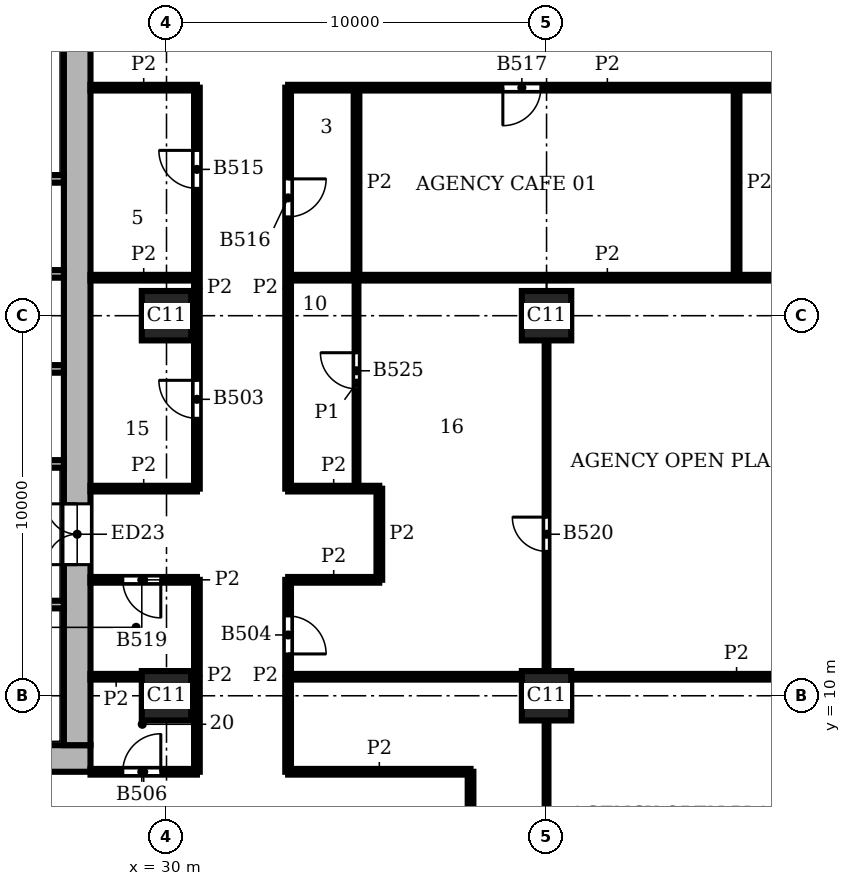
"""IFC4 building model, lengths in metres.
Left out: names, types, materials, properties, quantities, classifications, styles, units other than length and angle.
Written with IfcOpenShell. Run it as: python <this file> out.ifc"""

import sys

from ifc_helpers import new_model, si_unit, direction, frame, frame_2d, origin, origin_2d, place, context, subcontext, project, spatial, rectangle, extrude, element, fill, save


model = new_model("IFC4")
c1 = context("Model", 3, precision=1e-05, world=origin(), true_north=direction((0.0, 1.0)))
c2 = subcontext(c1, "Body", "Model", "MODEL_VIEW")
j1 = project(units=[si_unit("LENGTHUNIT", "METRE"), si_unit("PLANEANGLEUNIT", "RADIAN")], contexts=[c1])
p1 = place(None, origin())
s1 = spatial("IfcSite", under=j1, at=p1, CompositionType="ELEMENT")
p2 = place(p1, origin())
s2 = spatial("IfcBuilding", under=s1, at=p2, CompositionType="ELEMENT")
p3 = place(p2, frame((0.0, 0.0, 178.5)))
s3 = spatial("IfcBuildingStorey", under=s2, at=p3, CompositionType="ELEMENT", Elevation=178.5)
for number, where, z_axis, x_axis in (
    (1, (30.0, 10.0, 0.0), (0.0, 0.0, 1.0), (1.0, 0.0, 0.0)),
    (2, (30.0, 20.0, 0.0), (0.0, 0.0, 1.0), (1.0, 0.0, 0.0)),
    (3, (40.0, 10.0, 0.0), (0.0, 0.0, 1.0), (1.0, 0.0, 0.0)),
    (4, (40.0, 20.0, 0.0), (0.0, 0.0, 1.0), (1.0, 0.0, 0.0)),
):
    element("IfcColumn", number, at=place(p3, frame(where, z_axis=z_axis, x_axis=x_axis)), inside=s3, PredefinedType="COLUMN", context=c2, shape_type="SweptSolid", body=[
        extrude(rectangle(XDim=1.3, YDim=1.3, at=origin_2d()), origin(), (0.0, 0.0, 1.0), 3.9),
    ])
p4 = place(p3, frame((8.0, 8.35, 0.0), z_axis=(0.0, 0.0, 1.0), x_axis=(1.0, 0.0, 0.0)))
e5 = element("IfcWall", 5, at=p4, inside=s3, PredefinedType="SHEAR", context=c2, shape_type="SweptSolid", body=[
    extrude(rectangle(XDim=20.0, YDim=0.7, at=frame_2d((10.0, 0.0))), origin(), (0.0, 0.0, 1.0), 3.9),
])
p5 = place(p3, frame((27.65, 8.7, 0.0), z_axis=(0.0, 0.0, 1.0), x_axis=(0.0, 1.0, 0.0)))
e6 = element("IfcWall", 6, at=p5, inside=s3, PredefinedType="SHEAR", context=c2, shape_type="SweptSolid", body=[
    extrude(rectangle(XDim=18.6, YDim=0.7, at=frame_2d((9.3, 0.0))), origin(), (0.0, 0.0, 1.0), 3.9),
])
p6 = place(p5, frame((4.75, 0.0, 0.0)))
e7 = element("IfcOpeningElement", 7, at=p6, cuts=e6, PredefinedType="OPENING", context=c2, shape_type="SweptSolid", body=[
    extrude(rectangle(XDim=1.6, YDim=2.1, at=frame_2d((0.8, 1.05))), frame((0.0, 0.36, 0.0), z_axis=(0.0, -1.0, 0.0), x_axis=(1.0, 0.0, 0.0)), (0.0, 0.0, 1.0), 0.72),
])
p7 = place(p3, frame((13.8, 12.4, 0.0), z_axis=(0.0, 0.0, 1.0), x_axis=(1.0, 0.0, 0.0)))
e8 = element("IfcWall", 8, at=p7, inside=s3, PredefinedType="SHEAR", context=c2, shape_type="SweptSolid", body=[
    extrude(rectangle(XDim=13.5, YDim=0.2, at=frame_2d((6.75, 0.0))), origin(), (0.0, 0.0, 1.0), 3.58),
])
p8 = place(p7, frame((2.4, 0.0, 0.0)))
e9 = element("IfcOpeningElement", 9, at=p8, cuts=e8, PredefinedType="OPENING", context=c2, shape_type="SweptSolid", body=[
    extrude(rectangle(XDim=1.1, YDim=2.1, at=frame_2d((0.55, 1.05))), frame((0.0, 0.11, 0.0), z_axis=(0.0, -1.0, 0.0), x_axis=(1.0, 0.0, 0.0)), (0.0, 0.0, 1.0), 0.22),
])
p9 = place(p7, frame((4.9, 0.0, 0.0)))
e10 = element("IfcOpeningElement", 10, at=p9, cuts=e8, PredefinedType="OPENING", context=c2, shape_type="SweptSolid", body=[
    extrude(rectangle(XDim=1.1, YDim=2.1, at=frame_2d((0.55, 1.05))), frame((0.0, 0.11, 0.0), z_axis=(0.0, -1.0, 0.0), x_axis=(1.0, 0.0, 0.0)), (0.0, 0.0, 1.0), 0.22),
])
p10 = place(p7, frame((0.2, 0.0, 0.0)))
e11 = element("IfcOpeningElement", 11, at=p10, cuts=e8, PredefinedType="OPENING", context=c2, shape_type="SweptSolid", body=[
    extrude(rectangle(XDim=1.0, YDim=2.1, at=frame_2d((0.5, 1.05))), frame((0.0, 0.11, 0.0), z_axis=(0.0, -1.0, 0.0), x_axis=(1.0, 0.0, 0.0)), (0.0, 0.0, 1.0), 0.22),
])
for number, where, z_axis, x_axis in (
    (12, (24.3, 16.1, 0.0), (0.0, 0.0, 1.0), (1.0, 0.0, 0.0)),
    (13, (24.3, 18.6, 0.0), (0.0, 0.0, 1.0), (1.0, 0.0, 0.0)),
    (14, (24.3, 21.1, 0.0), (0.0, 0.0, 1.0), (1.0, 0.0, 0.0)),
):
    element("IfcWall", number, at=place(p3, frame(where, z_axis=z_axis, x_axis=x_axis)), inside=s3, PredefinedType="SHEAR", context=c2, shape_type="SweptSolid", body=[
        extrude(rectangle(XDim=3.0, YDim=0.2, at=frame_2d((1.5, 0.0))), origin(), (0.0, 0.0, 1.0), 3.58),
    ])
p11 = place(p3, frame((13.8, 23.6, 0.0), z_axis=(0.0, 0.0, 1.0), x_axis=(1.0, 0.0, 0.0)))
e15 = element("IfcWall", 15, at=p11, inside=s3, PredefinedType="SHEAR", context=c2, shape_type="SweptSolid", body=[
    extrude(rectangle(XDim=13.5, YDim=0.2, at=frame_2d((6.75, 0.0))), origin(), (0.0, 0.0, 1.0), 3.58),
])
p12 = place(p11, frame((2.4, 0.0, 0.0)))
e16 = element("IfcOpeningElement", 16, at=p12, cuts=e15, PredefinedType="OPENING", context=c2, shape_type="SweptSolid", body=[
    extrude(rectangle(XDim=1.1, YDim=2.1, at=frame_2d((0.55, 1.05))), frame((0.0, 0.11, 0.0), z_axis=(0.0, -1.0, 0.0), x_axis=(1.0, 0.0, 0.0)), (0.0, 0.0, 1.0), 0.22),
])
p13 = place(p11, frame((4.9, 0.0, 0.0)))
e17 = element("IfcOpeningElement", 17, at=p13, cuts=e15, PredefinedType="OPENING", context=c2, shape_type="SweptSolid", body=[
    extrude(rectangle(XDim=1.1, YDim=2.1, at=frame_2d((0.55, 1.05))), frame((0.0, 0.11, 0.0), z_axis=(0.0, -1.0, 0.0), x_axis=(1.0, 0.0, 0.0)), (0.0, 0.0, 1.0), 0.22),
])
p14 = place(p11, frame((0.2, 0.0, 0.0)))
e18 = element("IfcOpeningElement", 18, at=p14, cuts=e15, PredefinedType="OPENING", context=c2, shape_type="SweptSolid", body=[
    extrude(rectangle(XDim=1.0, YDim=2.1, at=frame_2d((0.5, 1.05))), frame((0.0, 0.11, 0.0), z_axis=(0.0, -1.0, 0.0), x_axis=(1.0, 0.0, 0.0)), (0.0, 0.0, 1.0), 0.22),
])
p15 = place(p3, frame((35.0, 15.451, 0.0), z_axis=(0.0, 0.0, 1.0), x_axis=(0.0, 1.0, 0.0)))
e19 = element("IfcWall", 19, at=p15, inside=s3, PredefinedType="PARTITIONING", context=c2, shape_type="SweptSolid", body=[
    extrude(rectangle(XDim=5.548, YDim=0.1, at=frame_2d((2.774, 0.0))), origin(), (0.0, 0.0, 1.0), 3.58),
])
p16 = place(p15, frame((2.625, 0.0, 0.0)))
e20 = element("IfcOpeningElement", 20, at=p16, cuts=e19, PredefinedType="OPENING", context=c2, shape_type="SweptSolid", body=[
    extrude(rectangle(XDim=0.95, YDim=2.1, at=frame_2d((0.475, 1.05))), frame((0.0, 0.06, 0.0), z_axis=(0.0, -1.0, 0.0), x_axis=(1.0, 0.0, 0.0)), (0.0, 0.0, 1.0), 0.12),
])
p17 = place(p3, frame((40.0, 0.45, 0.0), z_axis=(0.0, 0.0, 1.0), x_axis=(0.0, 1.0, 0.0)))
e21 = element("IfcWall", 21, at=p17, inside=s3, PredefinedType="PARTITIONING", context=c2, shape_type="SweptSolid", body=[
    extrude(rectangle(XDim=8.9, YDim=0.1, at=frame_2d((4.45, 0.0))), origin(), (0.0, 0.0, 1.0), 3.58),
])
p18 = place(p17, frame((4.0, 0.0, 0.0)))
e22 = element("IfcOpeningElement", 22, at=p18, cuts=e21, PredefinedType="OPENING", context=c2, shape_type="SweptSolid", body=[
    extrude(rectangle(XDim=0.9, YDim=2.1, at=frame_2d((0.45, 1.05))), frame((0.0, 0.06, 0.0), z_axis=(0.0, -1.0, 0.0), x_axis=(1.0, 0.0, 0.0)), (0.0, 0.0, 1.0), 0.12),
])
p19 = place(p3, frame((40.0, 10.65, 0.0), z_axis=(0.0, 0.0, 1.0), x_axis=(0.0, 1.0, 0.0)))
e23 = element("IfcWall", 23, at=p19, inside=s3, PredefinedType="PARTITIONING", context=c2, shape_type="SweptSolid", body=[
    extrude(rectangle(XDim=8.7, YDim=0.1, at=frame_2d((4.35, 0.0))), origin(), (0.0, 0.0, 1.0), 3.58),
])
p20 = place(p19, frame((3.15, 0.0, 0.0)))
e24 = element("IfcOpeningElement", 24, at=p20, cuts=e23, PredefinedType="OPENING", context=c2, shape_type="SweptSolid", body=[
    extrude(rectangle(XDim=0.9, YDim=2.1, at=frame_2d((0.45, 1.05))), frame((0.0, 0.06, 0.0), z_axis=(0.0, -1.0, 0.0), x_axis=(1.0, 0.0, 0.0)), (0.0, 0.0, 1.0), 0.12),
])
p21 = place(p3, frame((30.8, 8.0, 0.0), z_axis=(0.0, 0.0, 1.0), x_axis=(0.0, 1.0, 0.0)))
e25 = element("IfcWall", 25, at=p21, inside=s3, PredefinedType="PARTITIONING", context=c2, shape_type="SweptSolid", body=[
    extrude(rectangle(XDim=5.05, YDim=0.15, at=frame_2d((2.525, 0.0))), origin(), (0.0, 0.0, 1.0), 3.58),
])
p22 = place(p3, frame((30.8, 15.45, 0.0), z_axis=(0.0, 0.0, 1.0), x_axis=(0.0, 1.0, 0.0)))
e26 = element("IfcWall", 26, at=p22, inside=s3, PredefinedType="PARTITIONING", context=c2, shape_type="SweptSolid", body=[
    extrude(rectangle(XDim=10.55, YDim=0.15, at=frame_2d((5.275, 0.0))), origin(), (0.0, 0.0, 1.0), 3.58),
])
p23 = place(p22, frame((1.85, 0.0, 0.0)))
e27 = element("IfcOpeningElement", 27, at=p23, cuts=e26, PredefinedType="OPENING", context=c2, shape_type="SweptSolid", body=[
    extrude(rectangle(XDim=1.0, YDim=2.1, at=frame_2d((0.5, 1.05))), frame((0.0, 0.085, 0.0), z_axis=(0.0, -1.0, 0.0), x_axis=(1.0, 0.0, 0.0)), (0.0, 0.0, 1.0), 0.17),
])
p24 = place(p22, frame((7.9, 0.0, 0.0)))
e28 = element("IfcOpeningElement", 28, at=p24, cuts=e26, PredefinedType="OPENING", context=c2, shape_type="SweptSolid", body=[
    extrude(rectangle(XDim=1.0, YDim=2.1, at=frame_2d((0.5, 1.05))), frame((0.0, 0.085, 0.0), z_axis=(0.0, -1.0, 0.0), x_axis=(1.0, 0.0, 0.0)), (0.0, 0.0, 1.0), 0.17),
])
p25 = place(p3, frame((33.2, 8.0, 0.0), z_axis=(0.0, 0.0, 1.0), x_axis=(0.0, 1.0, 0.0)))
e29 = element("IfcWall", 29, at=p25, inside=s3, PredefinedType="PARTITIONING", context=c2, shape_type="SweptSolid", body=[
    extrude(rectangle(XDim=5.049, YDim=0.15, at=frame_2d((2.524, 0.0))), origin(), (0.0, 0.0, 1.0), 3.58),
])
p26 = place(p25, frame((3.1, 0.0, 0.0)))
e30 = element("IfcOpeningElement", 30, at=p26, cuts=e29, PredefinedType="OPENING", context=c2, shape_type="SweptSolid", body=[
    extrude(rectangle(XDim=1.0, YDim=2.1, at=frame_2d((0.5, 1.05))), frame((0.0, 0.085, 0.0), z_axis=(0.0, -1.0, 0.0), x_axis=(1.0, 0.0, 0.0)), (0.0, 0.0, 1.0), 0.17),
])
p27 = place(p3, frame((33.2, 15.45, 0.0), z_axis=(0.0, 0.0, 1.0), x_axis=(0.0, 1.0, 0.0)))
e31 = element("IfcWall", 31, at=p27, inside=s3, PredefinedType="PARTITIONING", context=c2, shape_type="SweptSolid", body=[
    extrude(rectangle(XDim=10.55, YDim=0.15, at=frame_2d((5.275, 0.0))), origin(), (0.0, 0.0, 1.0), 3.58),
])
p28 = place(p27, frame((7.15, 0.0, 0.0)))
e32 = element("IfcOpeningElement", 32, at=p28, cuts=e31, PredefinedType="OPENING", context=c2, shape_type="SweptSolid", body=[
    extrude(rectangle(XDim=1.0, YDim=2.1, at=frame_2d((0.5, 1.05))), frame((0.0, 0.085, 0.0), z_axis=(0.0, -1.0, 0.0), x_axis=(1.0, 0.0, 0.0)), (0.0, 0.0, 1.0), 0.17),
])
p29 = place(p3, frame((35.0, 21.0, 0.0), z_axis=(0.0, 0.0, 1.0), x_axis=(0.0, 1.0, 0.0)))
e33 = element("IfcWall", 33, at=p29, inside=s3, PredefinedType="PARTITIONING", context=c2, shape_type="SweptSolid", body=[
    extrude(rectangle(XDim=5.0, YDim=0.15, at=frame_2d((2.5, 0.0))), origin(), (0.0, 0.0, 1.0), 3.58),
])
p30 = place(p3, frame((35.6, 13.052, 0.0), z_axis=(0.0, 0.0, 1.0), x_axis=(0.0, 1.0, 0.0)))
e34 = element("IfcWall", 34, at=p30, inside=s3, PredefinedType="PARTITIONING", context=c2, shape_type="SweptSolid", body=[
    extrude(rectangle(XDim=2.396, YDim=0.15, at=frame_2d((1.198, 0.0))), origin(), (0.0, 0.0, 1.0), 3.58),
])
p31 = place(p3, frame((38.0, 4.5, 0.0), z_axis=(0.0, 0.0, 1.0), x_axis=(0.0, 1.0, 0.0)))
e35 = element("IfcWall", 35, at=p31, inside=s3, PredefinedType="PARTITIONING", context=c2, shape_type="SweptSolid", body=[
    extrude(rectangle(XDim=3.5, YDim=0.15, at=frame_2d((1.75, 0.0))), origin(), (0.0, 0.0, 1.0), 3.58),
])
p32 = place(p3, frame((45.0, 21.0, 0.0), z_axis=(0.0, 0.0, 1.0), x_axis=(0.0, 1.0, 0.0)))
e36 = element("IfcWall", 36, at=p32, inside=s3, PredefinedType="PARTITIONING", context=c2, shape_type="SweptSolid", body=[
    extrude(rectangle(XDim=5.0, YDim=0.15, at=frame_2d((2.5, 0.0))), origin(), (0.0, 0.0, 1.0), 3.58),
])
p33 = place(p3, frame((28.0, 8.0, 0.0), z_axis=(0.0, 0.0, 1.0), x_axis=(1.0, 0.0, 0.0)))
e37 = element("IfcWall", 37, at=p33, inside=s3, PredefinedType="PARTITIONING", context=c2, shape_type="SweptSolid", body=[
    extrude(rectangle(XDim=2.8, YDim=0.15, at=frame_2d((1.4, 0.0))), origin(), (0.0, 0.0, 1.0), 3.58),
])
p34 = place(p33, frame((0.85, 0.0, 0.0)))
e38 = element("IfcOpeningElement", 38, at=p34, cuts=e37, PredefinedType="OPENING", context=c2, shape_type="SweptSolid", body=[
    extrude(rectangle(XDim=1.0, YDim=2.1, at=frame_2d((0.5, 1.05))), frame((0.0, 0.085, 0.0), z_axis=(0.0, -1.0, 0.0), x_axis=(1.0, 0.0, 0.0)), (0.0, 0.0, 1.0), 0.17),
])
p35 = place(p3, frame((33.2, 8.0, 0.0), z_axis=(0.0, 0.0, 1.0), x_axis=(1.0, 0.0, 0.0)))
e39 = element("IfcWall", 39, at=p35, inside=s3, PredefinedType="PARTITIONING", context=c2, shape_type="SweptSolid", body=[
    extrude(rectangle(XDim=4.8, YDim=0.15, at=frame_2d((2.4, 0.0))), origin(), (0.0, 0.0, 1.0), 3.58),
])
p36 = place(p3, frame((28.0, 10.5, 0.0), z_axis=(0.0, 0.0, 1.0), x_axis=(1.0, 0.0, 0.0)))
e40 = element("IfcWall", 40, at=p36, inside=s3, PredefinedType="PARTITIONING", context=c2, shape_type="SweptSolid", body=[
    extrude(rectangle(XDim=1.35, YDim=0.15, at=frame_2d((0.675, 0.0))), origin(), (0.0, 0.0, 1.0), 3.58),
])
p37 = place(p3, frame((33.201, 10.5, 0.0), z_axis=(0.0, 0.0, 1.0), x_axis=(1.0, 0.0, 0.0)))
e41 = element("IfcWall", 41, at=p37, inside=s3, PredefinedType="PARTITIONING", context=c2, shape_type="SweptSolid", body=[
    extrude(rectangle(XDim=6.149, YDim=0.15, at=frame_2d((3.075, 0.0))), origin(), (0.0, 0.0, 1.0), 3.58),
])
p38 = place(p3, frame((40.65, 10.5, 0.0), z_axis=(0.0, 0.0, 1.0), x_axis=(1.0, 0.0, 0.0)))
e42 = element("IfcWall", 42, at=p38, inside=s3, PredefinedType="PARTITIONING", context=c2, shape_type="SweptSolid", body=[
    extrude(rectangle(XDim=8.7, YDim=0.15, at=frame_2d((4.35, 0.0))), origin(), (0.0, 0.0, 1.0), 3.58),
])
p39 = place(p3, frame((28.0, 13.05, 0.0), z_axis=(0.0, 0.0, 1.0), x_axis=(1.0, 0.0, 0.0)))
e43 = element("IfcWall", 43, at=p39, inside=s3, PredefinedType="PARTITIONING", context=c2, shape_type="SweptSolid", body=[
    extrude(rectangle(XDim=2.8, YDim=0.15, at=frame_2d((1.4, 0.0))), origin(), (0.0, 0.0, 1.0), 3.58),
])
p40 = place(p39, frame((0.85, 0.0, 0.0)))
e44 = element("IfcOpeningElement", 44, at=p40, cuts=e43, PredefinedType="OPENING", context=c2, shape_type="SweptSolid", body=[
    extrude(rectangle(XDim=1.0, YDim=2.1, at=frame_2d((0.5, 1.05))), frame((0.0, 0.085, 0.0), z_axis=(0.0, -1.0, 0.0), x_axis=(1.0, 0.0, 0.0)), (0.0, 0.0, 1.0), 0.17),
])
p41 = place(p3, frame((33.201, 13.05, 0.0), z_axis=(0.0, 0.0, 1.0), x_axis=(1.0, 0.0, 0.0)))
e45 = element("IfcWall", 45, at=p41, inside=s3, PredefinedType="PARTITIONING", context=c2, shape_type="SweptSolid", body=[
    extrude(rectangle(XDim=2.397, YDim=0.15, at=frame_2d((1.198, 0.0))), origin(), (0.0, 0.0, 1.0), 3.58),
])
p42 = place(p3, frame((28.0, 15.45, 0.0), z_axis=(0.0, 0.0, 1.0), x_axis=(1.0, 0.0, 0.0)))
e46 = element("IfcWall", 46, at=p42, inside=s3, PredefinedType="PARTITIONING", context=c2, shape_type="SweptSolid", body=[
    extrude(rectangle(XDim=2.8, YDim=0.15, at=frame_2d((1.4, 0.0))), origin(), (0.0, 0.0, 1.0), 3.58),
])
p43 = place(p3, frame((33.2, 15.45, 0.0), z_axis=(0.0, 0.0, 1.0), x_axis=(1.0, 0.0, 0.0)))
e47 = element("IfcWall", 47, at=p43, inside=s3, PredefinedType="PARTITIONING", context=c2, shape_type="SweptSolid", body=[
    extrude(rectangle(XDim=2.398, YDim=0.15, at=frame_2d((1.199, 0.0))), origin(), (0.0, 0.0, 1.0), 3.58),
])
p44 = place(p3, frame((28.0, 21.0, 0.0), z_axis=(0.0, 0.0, 1.0), x_axis=(1.0, 0.0, 0.0)))
e48 = element("IfcWall", 48, at=p44, inside=s3, PredefinedType="PARTITIONING", context=c2, shape_type="SweptSolid", body=[
    extrude(rectangle(XDim=2.8, YDim=0.15, at=frame_2d((1.4, 0.0))), origin(), (0.0, 0.0, 1.0), 3.58),
])
p45 = place(p3, frame((33.2, 21.0, 0.0), z_axis=(0.0, 0.0, 1.0), x_axis=(1.0, 0.0, 0.0)))
e49 = element("IfcWall", 49, at=p45, inside=s3, PredefinedType="PARTITIONING", context=c2, shape_type="SweptSolid", body=[
    extrude(rectangle(XDim=16.8, YDim=0.15, at=frame_2d((8.4, 0.0))), origin(), (0.0, 0.0, 1.0), 3.58),
])
p46 = place(p3, frame((28.0, 26.0, 0.0), z_axis=(0.0, 0.0, 1.0), x_axis=(1.0, 0.0, 0.0)))
e50 = element("IfcWall", 50, at=p46, inside=s3, PredefinedType="PARTITIONING", context=c2, shape_type="SweptSolid", body=[
    extrude(rectangle(XDim=2.8, YDim=0.15, at=frame_2d((1.4, 0.0))), origin(), (0.0, 0.0, 1.0), 3.58),
])
p47 = place(p3, frame((33.2, 26.0, 0.0), z_axis=(0.0, 0.0, 1.0), x_axis=(1.0, 0.0, 0.0)))
e51 = element("IfcWall", 51, at=p47, inside=s3, PredefinedType="PARTITIONING", context=c2, shape_type="SweptSolid", body=[
    extrude(rectangle(XDim=16.8, YDim=0.15, at=frame_2d((8.4, 0.0))), origin(), (0.0, 0.0, 1.0), 3.58),
])
p48 = place(p47, frame((5.65, 0.0, 0.0)))
e52 = element("IfcOpeningElement", 52, at=p48, cuts=e51, PredefinedType="OPENING", context=c2, shape_type="SweptSolid", body=[
    extrude(rectangle(XDim=1.0, YDim=2.1, at=frame_2d((0.5, 1.05))), frame((0.0, 0.085, 0.0), z_axis=(0.0, -1.0, 0.0), x_axis=(1.0, 0.0, 0.0)), (0.0, 0.0, 1.0), 0.17),
])
p49 = place(p47, frame((13.4, 0.0, 0.0)))
e53 = element("IfcOpeningElement", 53, at=p49, cuts=e51, PredefinedType="OPENING", context=c2, shape_type="SweptSolid", body=[
    extrude(rectangle(XDim=1.0, YDim=2.1, at=frame_2d((0.5, 1.05))), frame((0.0, 0.085, 0.0), z_axis=(0.0, -1.0, 0.0), x_axis=(1.0, 0.0, 0.0)), (0.0, 0.0, 1.0), 0.17),
])
p50 = place(p6, origin())
e54 = element("IfcDoor", 54, at=p50, inside=s3, OperationType="DOUBLE_DOOR_SINGLE_SWING", PredefinedType="DOOR", context=c2, shape_type="SweptSolid", body=[
    extrude(rectangle(XDim=1.6, YDim=2.1, at=frame_2d((0.8, 1.05))), frame((0.0, 0.025, 0.0), z_axis=(0.0, -1.0, 0.0), x_axis=(1.0, 0.0, 0.0)), (0.0, 0.0, 1.0), 0.05),
])
fill(e7, e54)
p51 = place(p23, origin())
e55 = element("IfcDoor", 55, at=p51, inside=s3, OperationType="SINGLE_SWING_RIGHT", PredefinedType="DOOR", context=c2, shape_type="SweptSolid", body=[
    extrude(rectangle(XDim=1.0, YDim=2.1, at=frame_2d((0.5, 1.05))), frame((0.0, 0.025, 0.0), z_axis=(0.0, -1.0, 0.0), x_axis=(1.0, 0.0, 0.0)), (0.0, 0.0, 1.0), 0.05),
])
fill(e27, e55)
p52 = place(p26, frame((1.0, 0.0, 0.0), z_axis=(0.0, 0.0, 1.0), x_axis=(-1.0, 0.0, 0.0)))
e56 = element("IfcDoor", 56, at=p52, inside=s3, OperationType="SINGLE_SWING_RIGHT", PredefinedType="DOOR", context=c2, shape_type="SweptSolid", body=[
    extrude(rectangle(XDim=1.0, YDim=2.1, at=frame_2d((0.5, 1.05))), frame((0.0, 0.025, 0.0), z_axis=(0.0, -1.0, 0.0), x_axis=(1.0, 0.0, 0.0)), (0.0, 0.0, 1.0), 0.05),
])
fill(e30, e56)
p53 = place(p34, origin())
e57 = element("IfcDoor", 57, at=p53, inside=s3, OperationType="SINGLE_SWING_RIGHT", PredefinedType="DOOR", context=c2, shape_type="SweptSolid", body=[
    extrude(rectangle(XDim=1.0, YDim=2.1, at=frame_2d((0.5, 1.05))), frame((0.0, 0.025, 0.0), z_axis=(0.0, -1.0, 0.0), x_axis=(1.0, 0.0, 0.0)), (0.0, 0.0, 1.0), 0.05),
])
fill(e38, e57)
p54 = place(p24, origin())
e58 = element("IfcDoor", 58, at=p54, inside=s3, OperationType="SINGLE_SWING_RIGHT", PredefinedType="DOOR", context=c2, shape_type="SweptSolid", body=[
    extrude(rectangle(XDim=1.0, YDim=2.1, at=frame_2d((0.5, 1.05))), frame((0.0, 0.025, 0.0), z_axis=(0.0, -1.0, 0.0), x_axis=(1.0, 0.0, 0.0)), (0.0, 0.0, 1.0), 0.05),
])
fill(e28, e58)
p55 = place(p28, frame((1.0, 0.0, 0.0), z_axis=(0.0, 0.0, 1.0), x_axis=(-1.0, 0.0, 0.0)))
e59 = element("IfcDoor", 59, at=p55, inside=s3, OperationType="SINGLE_SWING_LEFT", PredefinedType="DOOR", context=c2, shape_type="SweptSolid", body=[
    extrude(rectangle(XDim=1.0, YDim=2.1, at=frame_2d((0.5, 1.05))), frame((0.0, 0.025, 0.0), z_axis=(0.0, -1.0, 0.0), x_axis=(1.0, 0.0, 0.0)), (0.0, 0.0, 1.0), 0.05),
])
fill(e32, e59)
p56 = place(p48, frame((1.0, 0.0, 0.0), z_axis=(0.0, 0.0, 1.0), x_axis=(-1.0, 0.0, 0.0)))
e60 = element("IfcDoor", 60, at=p56, inside=s3, OperationType="SINGLE_SWING_RIGHT", PredefinedType="DOOR", context=c2, shape_type="SweptSolid", body=[
    extrude(rectangle(XDim=1.0, YDim=2.1, at=frame_2d((0.5, 1.05))), frame((0.0, 0.025, 0.0), z_axis=(0.0, -1.0, 0.0), x_axis=(1.0, 0.0, 0.0)), (0.0, 0.0, 1.0), 0.05),
])
fill(e52, e60)
p57 = place(p40, frame((1.0, 0.0, 0.0), z_axis=(0.0, 0.0, 1.0), x_axis=(-1.0, 0.0, 0.0)))
e61 = element("IfcDoor", 61, at=p57, inside=s3, OperationType="SINGLE_SWING_LEFT", PredefinedType="DOOR", context=c2, shape_type="SweptSolid", body=[
    extrude(rectangle(XDim=1.0, YDim=2.1, at=frame_2d((0.5, 1.05))), frame((0.0, 0.025, 0.0), z_axis=(0.0, -1.0, 0.0), x_axis=(1.0, 0.0, 0.0)), (0.0, 0.0, 1.0), 0.05),
])
fill(e44, e61)
p58 = place(p20, origin())
e62 = element("IfcDoor", 62, at=p58, inside=s3, OperationType="SINGLE_SWING_RIGHT", PredefinedType="DOOR", context=c2, shape_type="SweptSolid", body=[
    extrude(rectangle(XDim=0.9, YDim=2.1, at=frame_2d((0.45, 1.05))), frame((0.0, 0.025, 0.0), z_axis=(0.0, -1.0, 0.0), x_axis=(1.0, 0.0, 0.0)), (0.0, 0.0, 1.0), 0.05),
])
fill(e24, e62)
p59 = place(p16, origin())
e63 = element("IfcDoor", 63, at=p59, inside=s3, OperationType="SINGLE_SWING_RIGHT", PredefinedType="DOOR", context=c2, shape_type="SweptSolid", body=[
    extrude(rectangle(XDim=0.95, YDim=2.1, at=frame_2d((0.475, 1.05))), frame((0.0, 0.025, 0.0), z_axis=(0.0, -1.0, 0.0), x_axis=(1.0, 0.0, 0.0)), (0.0, 0.0, 1.0), 0.05),
])
fill(e20, e63)
save(model, sys.argv[1])
